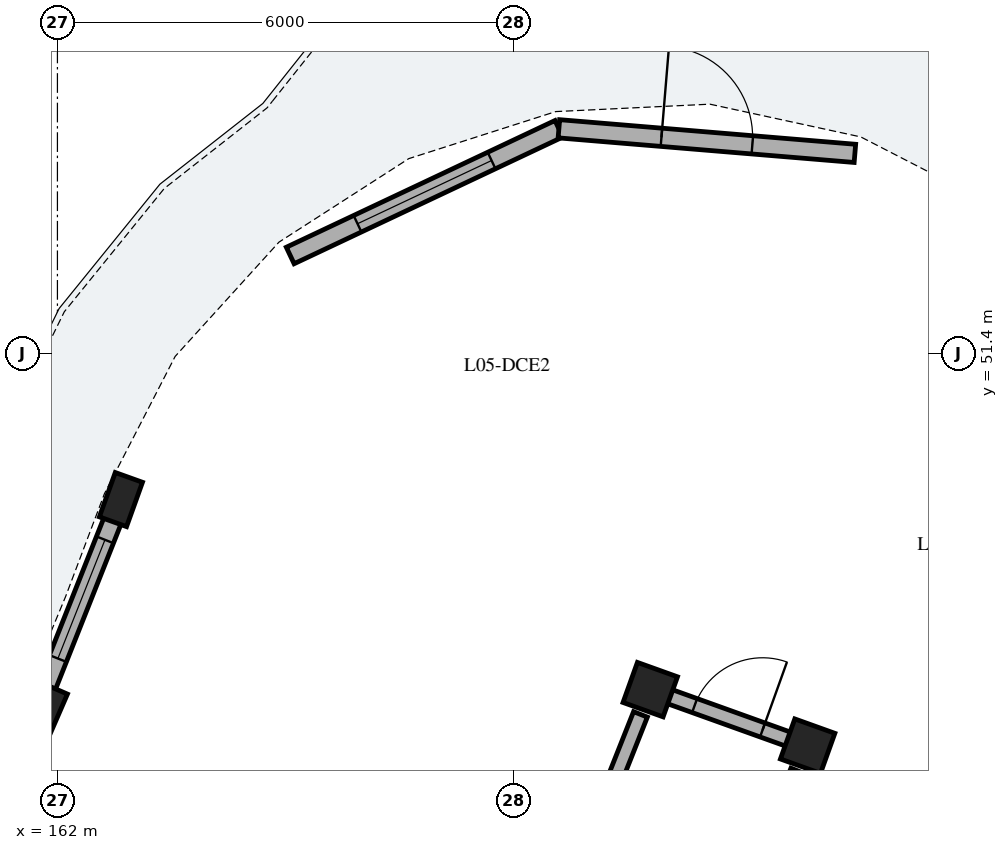
"""IFC4 building model, lengths in metres.
Left out: names, types, materials, properties, quantities, classifications, styles, units other than length and angle.
Written with IfcOpenShell. Run it as: python <this file> out.ifc"""

import sys

from ifc_helpers import new_model, si_unit, direction, frame, frame_2d, origin, origin_2d, place, context, subcontext, project, spatial, rectangle, extrude, element, fill, save


model = new_model("IFC4")
c1 = context("Model", 3, precision=1e-05, world=origin(), true_north=direction((0.0, 1.0)))
c2 = subcontext(c1, "Body", "Model", "MODEL_VIEW")
j1 = project(units=[si_unit("LENGTHUNIT", "METRE"), si_unit("PLANEANGLEUNIT", "RADIAN")], contexts=[c1])
p1 = place(None, origin())
s1 = spatial("IfcSite", under=j1, at=p1, CompositionType="ELEMENT")
p2 = place(p1, origin())
s2 = spatial("IfcBuilding", under=s1, at=p2, CompositionType="ELEMENT")
p3 = place(p2, frame((0.0, 0.0, 18.92)))
s3 = spatial("IfcBuildingStorey", under=s2, at=p3, CompositionType="ELEMENT", Elevation=18.92)
p4 = place(p3, frame((161.763, 46.776, 0.0), z_axis=(0.0, 0.0, 1.0), x_axis=(0.917060074385, -0.398749068925, 0.0)))
e1 = element("IfcColumn", 1, at=p4, inside=s3, PredefinedType="COLUMN", context=c2, shape_type="SweptSolid", body=[
    extrude(rectangle(XDim=0.56, YDim=0.56, at=origin_2d()), origin(), (0.0, 0.0, 1.0), 3.11),
])
p5 = place(p3, frame((162.835, 49.479, 0.0), z_axis=(0.0, 0.0, 1.0), x_axis=(0.941176015256, -0.337916718003, 0.0)))
e2 = element("IfcColumn", 2, at=p5, inside=s3, PredefinedType="PILASTER", context=c2, shape_type="SweptSolid", body=[
    extrude(rectangle(XDim=0.38, YDim=0.62, at=origin_2d()), origin(), (0.0, 0.0, 1.0), 3.11),
])
for number, where, z_axis, x_axis in (
    (3, (169.8, 46.979, 0.0), (0.0, 0.0, 1.0), (0.941, -0.338, 0.0)),
    (4, (171.871, 46.236, 0.0), (0.0, 0.0, 1.0), (0.941, -0.338, 0.0)),
):
    element("IfcColumn", number, at=place(p3, frame(where, z_axis=z_axis, x_axis=x_axis)), inside=s3, PredefinedType="COLUMN", context=c2, shape_type="SweptSolid", body=[
        extrude(rectangle(XDim=0.56, YDim=0.56, at=origin_2d()), origin(), (0.0, 0.0, 1.0), 3.11),
    ])
p6 = place(p3, frame((161.855, 47.008, 0.0), z_axis=(0.0, 0.0, 1.0), x_axis=(0.368558756085, 0.9296044553, 0.0)))
e5 = element("IfcWall", 5, at=p6, inside=s3, PredefinedType="SOLIDWALL", context=c2, shape_type="SweptSolid", body=[
    extrude(rectangle(XDim=2.499, YDim=0.24, at=frame_2d((1.249, 0.0))), origin(), (0.0, 0.0, 1.0), 2.355),
])
p7 = place(p6, frame((0.409, 0.0, 0.55)))
e6 = element("IfcOpeningElement", 6, at=p7, cuts=e5, PredefinedType="OPENING", context=c2, shape_type="SweptSolid", body=[
    extrude(rectangle(XDim=1.68, YDim=1.585, at=frame_2d((0.84, 0.792))), frame((0.0, 0.13, 0.0), z_axis=(0.0, -1.0, 0.0), x_axis=(1.0, 0.0, 0.0)), (0.0, 0.0, 1.0), 0.26),
])
p8 = place(p3, frame((165.063, 52.691, 0.0), z_axis=(0.0, 0.0, 1.0), x_axis=(0.904437504678, 0.426606141694, 0.0)))
e7 = element("IfcWall", 7, at=p8, inside=s3, PredefinedType="SOLIDWALL", context=c2, shape_type="SweptSolid", body=[
    extrude(rectangle(XDim=3.908, YDim=0.24, at=frame_2d((1.954, 0.0))), origin(), (0.0, 0.0, 1.0), 2.355),
])
p9 = place(p8, frame((0.979, 0.0, 0.4)))
e8 = element("IfcOpeningElement", 8, at=p9, cuts=e7, PredefinedType="OPENING", context=c2, shape_type="SweptSolid", body=[
    extrude(rectangle(XDim=1.95, YDim=1.78, at=frame_2d((0.975, 0.89))), frame((0.0, 0.13, 0.0), z_axis=(0.0, -1.0, 0.0), x_axis=(1.0, 0.0, 0.0)), (0.0, 0.0, 1.0), 0.26),
])
p10 = place(p3, frame((168.598, 54.358, 0.0), z_axis=(0.0, 0.0, 1.0), x_axis=(0.99656339927, -0.082833515165, 0.0)))
e9 = element("IfcWall", 9, at=p10, inside=s3, PredefinedType="SOLIDWALL", context=c2, shape_type="SweptSolid", body=[
    extrude(rectangle(XDim=3.908, YDim=0.24, at=frame_2d((1.954, 0.0))), origin(), (0.0, 0.0, 1.0), 2.355),
])
p11 = place(p10, frame((1.354, 0.0, 0.0)))
e10 = element("IfcOpeningElement", 10, at=p11, cuts=e9, PredefinedType="OPENING", context=c2, shape_type="SweptSolid", body=[
    extrude(rectangle(XDim=1.2, YDim=2.15, at=frame_2d((0.6, 1.075))), frame((0.0, 0.13, 0.0), z_axis=(0.0, -1.0, 0.0), x_axis=(1.0, 0.0, 0.0)), (0.0, 0.0, 1.0), 0.26),
])
p12 = place(p3, frame((170.696, 43.273, 0.0), z_axis=(0.0, 0.0, 1.0), x_axis=(0.368584691693, 0.929594172233, 0.0)))
e11 = element("IfcWall", 11, at=p12, inside=s3, PredefinedType="PARTITIONING", context=c2, shape_type="SweptSolid", body=[
    extrude(rectangle(XDim=2.837, YDim=0.195, at=frame_2d((1.418, 0.0))), origin(), (0.0, 0.0, 1.0), 2.37),
])
p13 = place(p12, frame((0.944, 0.0, 0.0)))
e12 = element("IfcOpeningElement", 12, at=p13, cuts=e11, PredefinedType="OPENING", context=c2, shape_type="SweptSolid", body=[
    extrude(rectangle(XDim=0.95, YDim=2.13, at=frame_2d((0.475, 1.065))), frame((0.0, 0.107, 0.0), z_axis=(0.0, -1.0, 0.0), x_axis=(1.0, 0.0, 0.0)), (0.0, 0.0, 1.0), 0.215),
])
p14 = place(p3, frame((168.678, 44.15, 0.0), z_axis=(0.0, 0.0, 1.0), x_axis=(0.368528468945, 0.929616462622, 0.0)))
e13 = element("IfcWall", 13, at=p14, inside=s3, PredefinedType="PARTITIONING", context=c2, shape_type="SweptSolid", body=[
    extrude(rectangle(XDim=2.693, YDim=0.195, at=frame_2d((1.346, 0.0))), origin(), (0.0, 0.0, 1.0), 2.37),
])
p15 = place(p14, frame((0.872, 0.0, 0.0)))
e14 = element("IfcOpeningElement", 14, at=p15, cuts=e13, PredefinedType="OPENING", context=c2, shape_type="SweptSolid", body=[
    extrude(rectangle(XDim=0.95, YDim=2.13, at=frame_2d((0.475, 1.065))), frame((0.0, 0.107, 0.0), z_axis=(0.0, -1.0, 0.0), x_axis=(1.0, 0.0, 0.0)), (0.0, 0.0, 1.0), 0.215),
])
p16 = place(p3, frame((169.847, 46.962, 0.0), z_axis=(0.0, 0.0, 1.0), x_axis=(0.941167179085, -0.337941327767, 0.0)))
e15 = element("IfcWall", 15, at=p16, inside=s3, PredefinedType="PARTITIONING", context=c2, shape_type="SweptSolid", body=[
    extrude(rectangle(XDim=2.1, YDim=0.195, at=frame_2d((1.05, 0.0))), origin(), (0.0, 0.0, 1.0), 2.37),
])
p17 = place(p16, frame((0.57, 0.0, 0.0)))
e16 = element("IfcOpeningElement", 16, at=p17, cuts=e15, PredefinedType="OPENING", context=c2, shape_type="SweptSolid", body=[
    extrude(rectangle(XDim=0.95, YDim=2.13, at=frame_2d((0.475, 1.065))), frame((0.0, 0.107, 0.0), z_axis=(0.0, -1.0, 0.0), x_axis=(1.0, 0.0, 0.0)), (0.0, 0.0, 1.0), 0.215),
])
p18 = place(p7, origin())
e17 = element("IfcWindow", 17, at=p18, inside=s3, PartitioningType="SINGLE_PANEL", PredefinedType="WINDOW", context=c2, shape_type="SweptSolid", body=[
    extrude(rectangle(XDim=1.68, YDim=1.585, at=frame_2d((0.84, 0.792))), frame((0.0, 0.03, 0.0), z_axis=(0.0, -1.0, 0.0), x_axis=(1.0, 0.0, 0.0)), (0.0, 0.0, 1.0), 0.06),
])
fill(e6, e17)
p19 = place(p9, origin())
e18 = element("IfcWindow", 18, at=p19, inside=s3, PartitioningType="SINGLE_PANEL", PredefinedType="WINDOW", context=c2, shape_type="SweptSolid", body=[
    extrude(rectangle(XDim=1.95, YDim=1.78, at=frame_2d((0.975, 0.89))), frame((0.0, 0.03, 0.0), z_axis=(0.0, -1.0, 0.0), x_axis=(1.0, 0.0, 0.0)), (0.0, 0.0, 1.0), 0.06),
])
fill(e8, e18)
p20 = place(p11, origin())
e19 = element("IfcDoor", 19, at=p20, inside=s3, OperationType="SINGLE_SWING_LEFT", PredefinedType="DOOR", context=c2, shape_type="SweptSolid", body=[
    extrude(rectangle(XDim=1.2, YDim=2.15, at=frame_2d((0.6, 1.075))), frame((0.0, 0.025, 0.0), z_axis=(0.0, -1.0, 0.0), x_axis=(1.0, 0.0, 0.0)), (0.0, 0.0, 1.0), 0.05),
])
fill(e10, e19)
p21 = place(p17, origin())
e20 = element("IfcDoor", 20, at=p21, inside=s3, OperationType="SINGLE_SWING_RIGHT", PredefinedType="DOOR", context=c2, shape_type="SweptSolid", body=[
    extrude(rectangle(XDim=0.95, YDim=2.13, at=frame_2d((0.475, 1.065))), frame((0.0, 0.025, 0.0), z_axis=(0.0, -1.0, 0.0), x_axis=(1.0, 0.0, 0.0)), (0.0, 0.0, 1.0), 0.05),
])
fill(e16, e20)
save(model, sys.argv[1])
